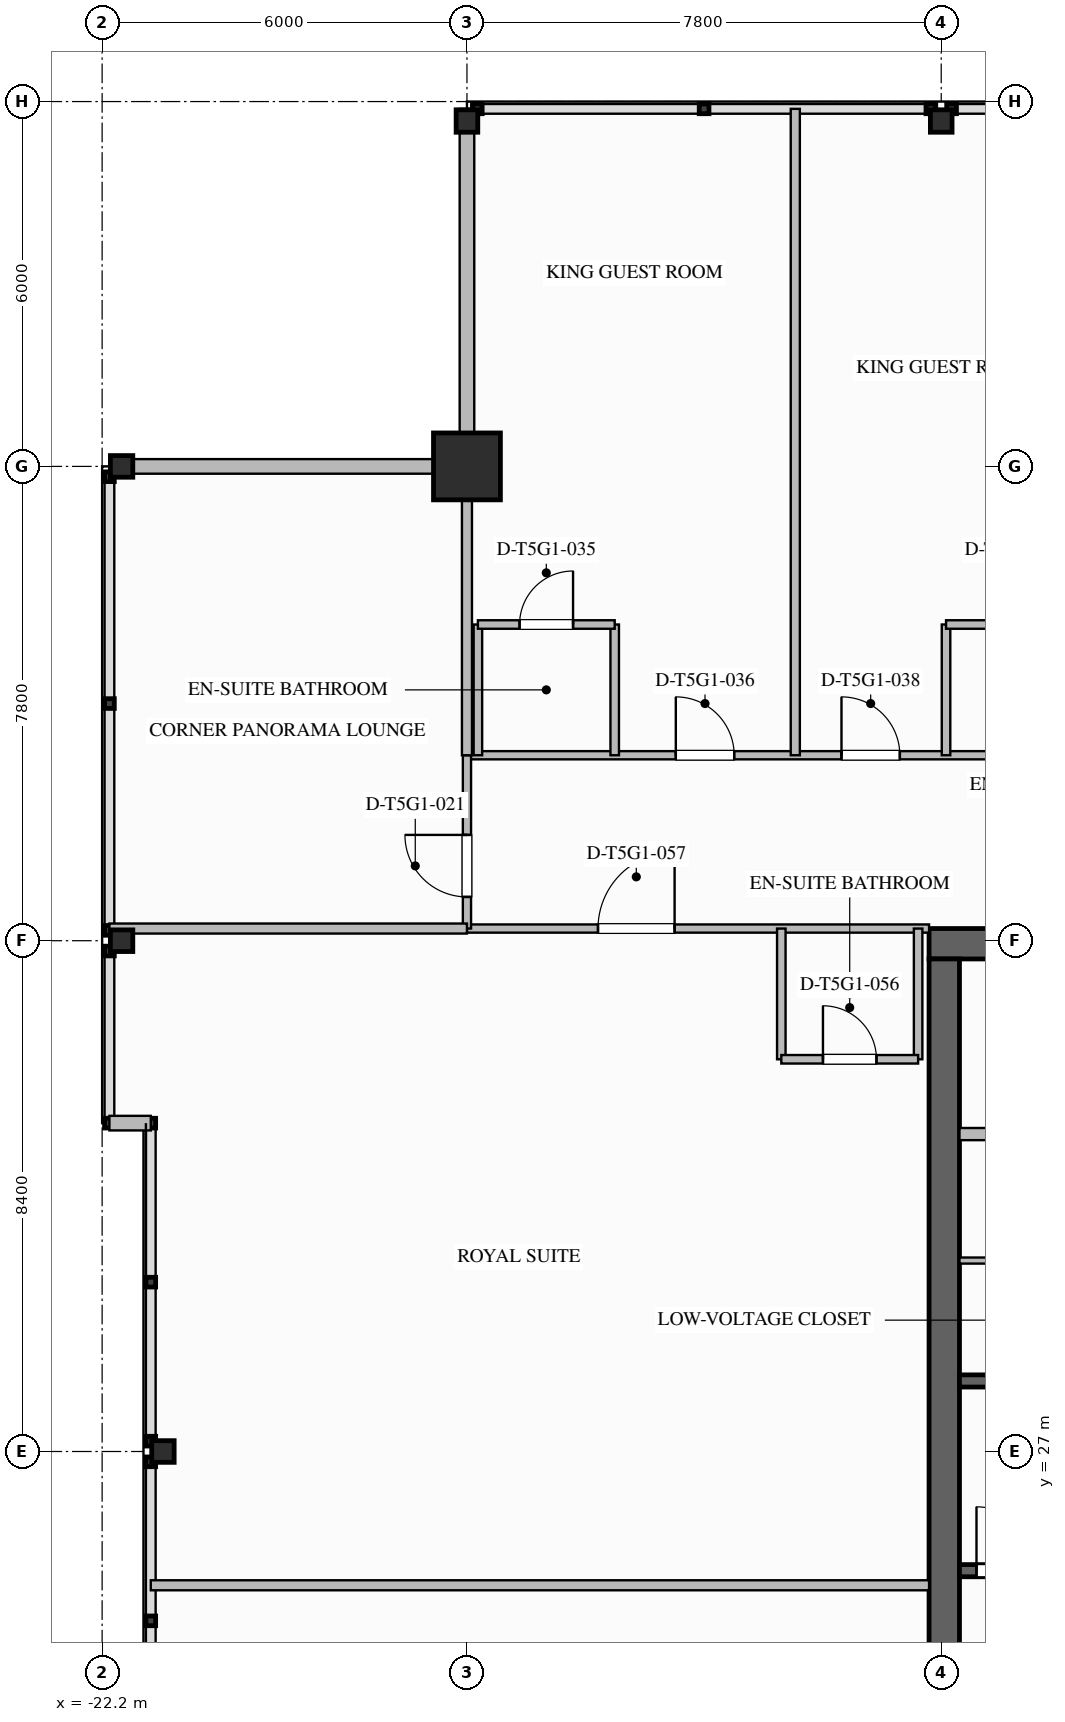
"""IFC4 building model, lengths in metres.
Left out: names, types, materials, properties, quantities, classifications, styles, units other than length and angle.
Written with IfcOpenShell. Run it as: python <this file> out.ifc"""

import sys

from ifc_helpers import new_model, si_unit, direction, frame, frame_2d, origin, origin_2d, place, context, subcontext, project, spatial, rectangle, i_section, extrude, element, fill, save


model = new_model("IFC4")
c1 = context("Model", 3, precision=1e-05, world=origin(), true_north=direction((0.0, 1.0)))
c2 = subcontext(c1, "Body", "Model", "MODEL_VIEW")
j1 = project(units=[si_unit("LENGTHUNIT", "METRE"), si_unit("PLANEANGLEUNIT", "RADIAN")], contexts=[c1])
p1 = place(None, origin())
s1 = spatial("IfcSite", under=j1, at=p1, CompositionType="ELEMENT")
p2 = place(p1, origin())
s2 = spatial("IfcBuilding", under=s1, at=p2, CompositionType="ELEMENT")
p3 = place(p2, frame((0.0, 0.0, 272.3)))
s3 = spatial("IfcBuildingStorey", under=s2, at=p3, CompositionType="ELEMENT", Elevation=272.3)
p4 = place(p3, frame((-8.6, 35.35, 0.0), z_axis=(0.0, 0.0, 1.0), x_axis=(1.0, 0.0, 0.0)))
e1 = element("IfcWall", 1, at=p4, inside=s3, PredefinedType="SHEAR", context=c2, shape_type="SweptSolid", body=[
    extrude(rectangle(XDim=17.2, YDim=0.5, at=frame_2d((8.6, 0.0))), origin(), (0.0, 0.0, 1.0), 3.65),
])
p5 = place(p3, frame((-8.35, 18.9, 0.0), z_axis=(0.0, 0.0, 1.0), x_axis=(0.0, 1.0, 0.0)))
e2 = element("IfcWall", 2, at=p5, inside=s3, PredefinedType="SHEAR", context=c2, shape_type="SweptSolid", body=[
    extrude(rectangle(XDim=16.2, YDim=0.5, at=frame_2d((8.1, 0.0))), origin(), (0.0, 0.0, 1.0), 3.65),
])
p6 = place(p3, frame((-16.2, 43.2, 0.0), z_axis=(0.0, 0.0, 1.0), x_axis=(1.0, 0.0, 0.0)))
e3 = element("IfcColumn", 3, at=p6, inside=s3, PredefinedType="COLUMN", context=c2, shape_type="SweptSolid", body=[
    extrude(rectangle(XDim=1.1, YDim=1.1, at=origin_2d()), origin(), (0.0, 0.0, 1.0), 3.65),
])
for number, where, z_axis, x_axis in (
    (4, (-21.2, 27.0, 0.0), (0.0, 0.0, 1.0), (1.0, 0.0, 0.0)),
    (5, (-21.88, 35.4, 0.0), (0.0, 0.0, 1.0), (1.0, 0.0, 0.0)),
    (6, (-21.88, 43.2, 0.0), (0.0, 0.0, 1.0), (1.0, 0.0, 0.0)),
    (7, (-16.2, 48.88, 0.0), (0.0, 0.0, 1.0), (0.0, 1.0, 0.0)),
    (8, (-8.4, 48.88, 0.0), (0.0, 0.0, 1.0), (0.0, 1.0, 0.0)),
):
    element("IfcColumn", number, at=place(p3, frame(where, z_axis=z_axis, x_axis=x_axis)), inside=s3, PredefinedType="COLUMN", context=c2, shape_type="SweptSolid", body=[
        extrude(i_section(OverallWidth=0.369, OverallDepth=0.356, WebThickness=0.011, FlangeThickness=0.018, FilletRadius=0.025, at=origin_2d()), origin(), (0.0, 0.0, 1.0), 3.647),
    ])
for number, where, z_axis, x_axis in (
    (9, (-22.08, 43.2, 0.0), (0.0, 0.0, 1.0), (1.0, 0.0, 0.0)),
    (10, (-16.2, 43.2, 0.0), (0.0, 0.0, 1.0), (0.0, 1.0, 0.0)),
):
    element("IfcWall", number, at=place(p3, frame(where, z_axis=z_axis, x_axis=x_axis)), inside=s3, PredefinedType="STANDARD", context=c2, shape_type="SweptSolid", body=[
        extrude(rectangle(XDim=5.88, YDim=0.24, at=frame_2d((2.94, 0.0))), origin(), (0.0, 0.0, 1.0), 2.779),
    ])
p7 = place(p3, frame((-21.4, 32.4, 0.0), z_axis=(0.0, 0.0, 1.0), x_axis=(-1.0, 0.0, 0.0)))
e11 = element("IfcWall", 11, at=p7, inside=s3, PredefinedType="STANDARD", context=c2, shape_type="SweptSolid", body=[
    extrude(rectangle(XDim=0.68, YDim=0.24, at=frame_2d((0.34, 0.0))), origin(), (0.0, 0.0, 1.0), 3.39),
])
p8 = place(p3, frame((-8.1, 25.04, 0.0), z_axis=(0.0, 0.0, 1.0), x_axis=(1.0, 0.0, 0.0)))
e12 = element("IfcWall", 12, at=p8, inside=s3, PredefinedType="SOLIDWALL", context=c2, shape_type="SweptSolid", body=[
    extrude(rectangle(XDim=8.1, YDim=0.2, at=frame_2d((4.05, 0.0))), origin(), (0.0, 0.0, 1.0), 3.39),
])
p9 = place(p8, frame((0.28, 0.0, 0.0)))
e13 = element("IfcOpeningElement", 13, at=p9, cuts=e12, PredefinedType="OPENING", context=c2, shape_type="SweptSolid", body=[
    extrude(rectangle(XDim=1.05, YDim=2.1, at=frame_2d((0.525, 1.05))), frame((0.0, 0.11, 0.0), z_axis=(0.0, -1.0, 0.0), x_axis=(1.0, 0.0, 0.0)), (0.0, 0.0, 1.0), 0.22),
])
p10 = place(p3, frame((-8.1, 28.16, 0.0), z_axis=(0.0, 0.0, 1.0), x_axis=(1.0, 0.0, 0.0)))
e14 = element("IfcWall", 14, at=p10, inside=s3, PredefinedType="SOLIDWALL", context=c2, shape_type="SweptSolid", body=[
    extrude(rectangle(XDim=8.1, YDim=0.2, at=frame_2d((4.05, 0.0))), origin(), (0.0, 0.0, 1.0), 3.39),
])
p11 = place(p3, frame((-8.1, 32.22, 0.0), z_axis=(0.0, 0.0, 1.0), x_axis=(1.0, 0.0, 0.0)))
e15 = element("IfcWall", 15, at=p11, inside=s3, PredefinedType="SOLIDWALL", context=c2, shape_type="SweptSolid", body=[
    extrude(rectangle(XDim=7.1, YDim=0.2, at=frame_2d((3.55, 0.0))), origin(), (0.0, 0.0, 1.0), 3.39),
])
p12 = place(p11, frame((0.95, 0.0, 0.0)))
e16 = element("IfcOpeningElement", 16, at=p12, cuts=e15, PredefinedType="OPENING", context=c2, shape_type="SweptSolid", body=[
    extrude(rectangle(XDim=1.1, YDim=2.2, at=frame_2d((0.55, 1.1))), frame((0.0, 0.11, 0.0), z_axis=(0.0, -1.0, 0.0), x_axis=(1.0, 0.0, 0.0)), (0.0, 0.0, 1.0), 0.22),
])
p13 = place(p11, frame((3.27, 0.0, 0.0)))
e17 = element("IfcOpeningElement", 17, at=p13, cuts=e15, PredefinedType="OPENING", context=c2, shape_type="SweptSolid", body=[
    extrude(rectangle(XDim=1.1, YDim=2.2, at=frame_2d((0.55, 1.1))), frame((0.0, 0.11, 0.0), z_axis=(0.0, -1.0, 0.0), x_axis=(1.0, 0.0, 0.0)), (0.0, 0.0, 1.0), 0.22),
])
p14 = place(p11, frame((5.59, 0.0, 0.0)))
e18 = element("IfcOpeningElement", 18, at=p14, cuts=e15, PredefinedType="OPENING", context=c2, shape_type="SweptSolid", body=[
    extrude(rectangle(XDim=1.1, YDim=2.2, at=frame_2d((0.55, 1.1))), frame((0.0, 0.11, 0.0), z_axis=(0.0, -1.0, 0.0), x_axis=(1.0, 0.0, 0.0)), (0.0, 0.0, 1.0), 0.22),
])
p15 = place(p3, frame((-8.1, 30.14, 0.0), z_axis=(0.0, 0.0, 1.0), x_axis=(1.0, 0.0, 0.0)))
e19 = element("IfcWall", 19, at=p15, inside=s3, PredefinedType="PARTITIONING", context=c2, shape_type="SweptSolid", body=[
    extrude(rectangle(XDim=7.1, YDim=0.1, at=frame_2d((3.55, 0.0))), origin(), (0.0, 0.0, 1.0), 3.39),
])
p16 = place(p15, frame((0.55, 0.0, 0.0)))
e20 = element("IfcOpeningElement", 20, at=p16, cuts=e19, PredefinedType="OPENING", context=c2, shape_type="SweptSolid", body=[
    extrude(rectangle(XDim=0.88, YDim=2.1, at=frame_2d((0.44, 1.05))), frame((0.0, 0.06, 0.0), z_axis=(0.0, -1.0, 0.0), x_axis=(1.0, 0.0, 0.0)), (0.0, 0.0, 1.0), 0.12),
])
p17 = place(p15, frame((3.6, 0.0, 0.0)))
e21 = element("IfcOpeningElement", 21, at=p17, cuts=e19, PredefinedType="OPENING", context=c2, shape_type="SweptSolid", body=[
    extrude(rectangle(XDim=0.92, YDim=2.1, at=frame_2d((0.46, 1.05))), frame((0.0, 0.06, 0.0), z_axis=(0.0, -1.0, 0.0), x_axis=(1.0, 0.0, 0.0)), (0.0, 0.0, 1.0), 0.12),
])
p18 = place(p3, frame((-16.2, 38.45, 0.0), z_axis=(0.0, 0.0, 1.0), x_axis=(1.0, 0.0, 0.0)))
e22 = element("IfcWall", 22, at=p18, inside=s3, PredefinedType="PARTITIONING", context=c2, shape_type="SweptSolid", body=[
    extrude(rectangle(XDim=38.28, YDim=0.135, at=frame_2d((19.14, 0.0))), origin(), (0.0, 0.0, 1.0), 3.39),
])
p19 = place(p18, frame((33.355, 0.0, 0.0)))
e23 = element("IfcOpeningElement", 23, at=p19, cuts=e22, PredefinedType="OPENING", context=c2, shape_type="SweptSolid", body=[
    extrude(rectangle(XDim=1.26, YDim=2.2, at=frame_2d((0.63, 1.1))), frame((0.0, 0.077, 0.0), z_axis=(0.0, -1.0, 0.0), x_axis=(1.0, 0.0, 0.0)), (0.0, 0.0, 1.0), 0.155),
])
p20 = place(p18, frame((3.435, 0.0, 0.0)))
e24 = element("IfcOpeningElement", 24, at=p20, cuts=e22, PredefinedType="OPENING", context=c2, shape_type="SweptSolid", body=[
    extrude(rectangle(XDim=0.96, YDim=2.15, at=frame_2d((0.48, 1.075))), frame((0.0, 0.077, 0.0), z_axis=(0.0, -1.0, 0.0), x_axis=(1.0, 0.0, 0.0)), (0.0, 0.0, 1.0), 0.155),
])
p21 = place(p18, frame((6.16, 0.0, 0.0)))
e25 = element("IfcOpeningElement", 25, at=p21, cuts=e22, PredefinedType="OPENING", context=c2, shape_type="SweptSolid", body=[
    extrude(rectangle(XDim=0.96, YDim=2.15, at=frame_2d((0.48, 1.075))), frame((0.0, 0.077, 0.0), z_axis=(0.0, -1.0, 0.0), x_axis=(1.0, 0.0, 0.0)), (0.0, 0.0, 1.0), 0.155),
])
p22 = place(p18, frame((13.99, 0.0, 0.0)))
e26 = element("IfcOpeningElement", 26, at=p22, cuts=e22, PredefinedType="OPENING", context=c2, shape_type="SweptSolid", body=[
    extrude(rectangle(XDim=0.96, YDim=2.15, at=frame_2d((0.48, 1.075))), frame((0.0, 0.077, 0.0), z_axis=(0.0, -1.0, 0.0), x_axis=(1.0, 0.0, 0.0)), (0.0, 0.0, 1.0), 0.155),
])
p23 = place(p18, frame((17.45, 0.0, 0.0)))
e27 = element("IfcOpeningElement", 27, at=p23, cuts=e22, PredefinedType="OPENING", context=c2, shape_type="SweptSolid", body=[
    extrude(rectangle(XDim=0.96, YDim=2.15, at=frame_2d((0.48, 1.075))), frame((0.0, 0.077, 0.0), z_axis=(0.0, -1.0, 0.0), x_axis=(1.0, 0.0, 0.0)), (0.0, 0.0, 1.0), 0.155),
])
p24 = place(p18, frame((25.281, 0.0, 0.0)))
e28 = element("IfcOpeningElement", 28, at=p24, cuts=e22, PredefinedType="OPENING", context=c2, shape_type="SweptSolid", body=[
    extrude(rectangle(XDim=0.96, YDim=2.15, at=frame_2d((0.48, 1.075))), frame((0.0, 0.077, 0.0), z_axis=(0.0, -1.0, 0.0), x_axis=(1.0, 0.0, 0.0)), (0.0, 0.0, 1.0), 0.155),
])
p25 = place(p18, frame((28.005, 0.0, 0.0)))
e29 = element("IfcOpeningElement", 29, at=p25, cuts=e22, PredefinedType="OPENING", context=c2, shape_type="SweptSolid", body=[
    extrude(rectangle(XDim=0.96, YDim=2.15, at=frame_2d((0.48, 1.075))), frame((0.0, 0.077, 0.0), z_axis=(0.0, -1.0, 0.0), x_axis=(1.0, 0.0, 0.0)), (0.0, 0.0, 1.0), 0.155),
])
p26 = place(p3, frame((-16.2, 35.6, 0.0), z_axis=(0.0, 0.0, 1.0), x_axis=(1.0, 0.0, 0.0)))
e30 = element("IfcWall", 30, at=p26, inside=s3, PredefinedType="PARTITIONING", context=c2, shape_type="SweptSolid", body=[
    extrude(rectangle(XDim=7.6, YDim=0.135, at=frame_2d((3.8, 0.0))), origin(), (0.0, 0.0, 1.0), 2.767),
])
p27 = place(p26, frame((2.155, 0.0, 0.0)))
e31 = element("IfcOpeningElement", 31, at=p27, cuts=e30, PredefinedType="OPENING", context=c2, shape_type="SweptSolid", body=[
    extrude(rectangle(XDim=1.26, YDim=2.2, at=frame_2d((0.63, 1.1))), frame((0.0, 0.077, 0.0), z_axis=(0.0, -1.0, 0.0), x_axis=(1.0, 0.0, 0.0)), (0.0, 0.0, 1.0), 0.155),
])
p28 = place(p3, frame((-16.2, 35.6, 0.0), z_axis=(0.0, 0.0, 1.0), x_axis=(0.0, 1.0, 0.0)))
e32 = element("IfcWall", 32, at=p28, inside=s3, PredefinedType="PARTITIONING", context=c2, shape_type="SweptSolid", body=[
    extrude(rectangle(XDim=2.85, YDim=0.135, at=frame_2d((1.425, 0.0))), origin(), (0.0, 0.0, 1.0), 2.764),
])
p29 = place(p28, frame((0.52, 0.0, 0.0)))
e33 = element("IfcOpeningElement", 33, at=p29, cuts=e32, PredefinedType="OPENING", context=c2, shape_type="SweptSolid", body=[
    extrude(rectangle(XDim=1.02, YDim=2.15, at=frame_2d((0.51, 1.075))), frame((0.0, 0.077, 0.0), z_axis=(0.0, -1.0, 0.0), x_axis=(1.0, 0.0, 0.0)), (0.0, 0.0, 1.0), 0.155),
])
p30 = place(p3, frame((-16.2, 38.45, 0.0), z_axis=(0.0, 0.0, 1.0), x_axis=(0.0, 1.0, 0.0)))
e34 = element("IfcWall", 34, at=p30, inside=s3, PredefinedType="PARTITIONING", context=c2, shape_type="SweptSolid", body=[
    extrude(rectangle(XDim=4.63, YDim=0.165, at=frame_2d((2.315, 0.0))), origin(), (0.0, 0.0, 1.0), 2.764),
])
p31 = place(p3, frame((-22.08, 35.6, 0.0), z_axis=(0.0, 0.0, 1.0), x_axis=(1.0, 0.0, 0.0)))
e35 = element("IfcWall", 35, at=p31, inside=s3, PredefinedType="PARTITIONING", context=c2, shape_type="SweptSolid", body=[
    extrude(rectangle(XDim=5.88, YDim=0.165, at=frame_2d((2.94, 0.0))), origin(), (0.0, 0.0, 1.0), 2.764),
])
p32 = place(p3, frame((-16.02, 38.45, 0.0), z_axis=(0.0, 0.0, 1.0), x_axis=(0.0, 1.0, 0.0)))
e36 = element("IfcWall", 36, at=p32, inside=s3, PredefinedType="PLUMBINGWALL", context=c2, shape_type="SweptSolid", body=[
    extrude(rectangle(XDim=2.15, YDim=0.14, at=frame_2d((1.075, 0.0))), origin(), (0.0, 0.0, 1.0), 2.764),
])
p33 = place(p3, frame((-13.77, 38.45, 0.0), z_axis=(0.0, 0.0, 1.0), x_axis=(0.0, 1.0, 0.0)))
e37 = element("IfcWall", 37, at=p33, inside=s3, PredefinedType="PLUMBINGWALL", context=c2, shape_type="SweptSolid", body=[
    extrude(rectangle(XDim=2.15, YDim=0.14, at=frame_2d((1.075, 0.0))), origin(), (0.0, 0.0, 1.0), 3.39),
])
p34 = place(p3, frame((-16.02, 40.6, 0.0), z_axis=(0.0, 0.0, 1.0), x_axis=(1.0, 0.0, 0.0)))
e38 = element("IfcWall", 38, at=p34, inside=s3, PredefinedType="PLUMBINGWALL", context=c2, shape_type="SweptSolid", body=[
    extrude(rectangle(XDim=2.25, YDim=0.14, at=frame_2d((1.125, 0.0))), origin(), (0.0, 0.0, 1.0), 3.39),
])
p35 = place(p34, frame((0.685, 0.0, 0.0)))
e39 = element("IfcOpeningElement", 39, at=p35, cuts=e38, PredefinedType="OPENING", context=c2, shape_type="SweptSolid", body=[
    extrude(rectangle(XDim=0.88, YDim=2.1, at=frame_2d((0.44, 1.05))), frame((0.0, 0.08, 0.0), z_axis=(0.0, -1.0, 0.0), x_axis=(1.0, 0.0, 0.0)), (0.0, 0.0, 1.0), 0.16),
])
p36 = place(p3, frame((-10.8, 38.45, 0.0), z_axis=(0.0, 0.0, 1.0), x_axis=(0.0, 1.0, 0.0)))
e40 = element("IfcWall", 40, at=p36, inside=s3, PredefinedType="PARTITIONING", context=c2, shape_type="SweptSolid", body=[
    extrude(rectangle(XDim=10.63, YDim=0.15, at=frame_2d((5.315, 0.0))), origin(), (0.0, 0.0, 1.0), 3.39),
])
p37 = place(p3, frame((-8.321, 38.45, 0.0), z_axis=(0.0, 0.0, 1.0), x_axis=(0.0, 1.0, 0.0)))
e41 = element("IfcWall", 41, at=p37, inside=s3, PredefinedType="PLUMBINGWALL", context=c2, shape_type="SweptSolid", body=[
    extrude(rectangle(XDim=2.15, YDim=0.14, at=frame_2d((1.075, 0.0))), origin(), (0.0, 0.0, 1.0), 2.767),
])
p38 = place(p3, frame((-8.321, 40.6, 0.0), z_axis=(0.0, 0.0, 1.0), x_axis=(1.0, 0.0, 0.0)))
e42 = element("IfcWall", 42, at=p38, inside=s3, PredefinedType="PLUMBINGWALL", context=c2, shape_type="SweptSolid", body=[
    extrude(rectangle(XDim=2.25, YDim=0.14, at=frame_2d((1.125, 0.0))), origin(), (0.0, 0.0, 1.0), 3.39),
])
p39 = place(p38, frame((0.685, 0.0, 0.0)))
e43 = element("IfcOpeningElement", 43, at=p39, cuts=e42, PredefinedType="OPENING", context=c2, shape_type="SweptSolid", body=[
    extrude(rectangle(XDim=0.88, YDim=2.1, at=frame_2d((0.44, 1.05))), frame((0.0, 0.08, 0.0), z_axis=(0.0, -1.0, 0.0), x_axis=(1.0, 0.0, 0.0)), (0.0, 0.0, 1.0), 0.16),
])
p40 = place(p3, frame((-21.4, 24.8, 0.0), z_axis=(0.0, 0.0, 1.0), x_axis=(1.0, 0.0, 0.0)))
e44 = element("IfcWall", 44, at=p40, inside=s3, PredefinedType="PARTITIONING", context=c2, shape_type="SweptSolid", body=[
    extrude(rectangle(XDim=12.8, YDim=0.165, at=frame_2d((6.4, 0.0))), origin(), (0.0, 0.0, 1.0), 3.39),
])
for number, where, z_axis, x_axis in (
    (45, (-11.03, 35.6, 0.0), (0.0, 0.0, 1.0), (0.0, -1.0, 0.0)),
    (46, (-8.78, 35.6, 0.0), (0.0, 0.0, 1.0), (0.0, -1.0, 0.0)),
):
    element("IfcWall", number, at=place(p3, frame(where, z_axis=z_axis, x_axis=x_axis)), inside=s3, PredefinedType="PLUMBINGWALL", context=c2, shape_type="SweptSolid", body=[
        extrude(rectangle(XDim=2.15, YDim=0.14, at=frame_2d((1.075, 0.0))), origin(), (0.0, 0.0, 1.0), 3.39),
    ])
p41 = place(p3, frame((-11.03, 33.45, 0.0), z_axis=(0.0, 0.0, 1.0), x_axis=(1.0, 0.0, 0.0)))
e47 = element("IfcWall", 47, at=p41, inside=s3, PredefinedType="PLUMBINGWALL", context=c2, shape_type="SweptSolid", body=[
    extrude(rectangle(XDim=2.25, YDim=0.14, at=frame_2d((1.125, 0.0))), origin(), (0.0, 0.0, 1.0), 3.39),
])
p42 = place(p41, frame((0.685, 0.0, 0.0)))
e48 = element("IfcOpeningElement", 48, at=p42, cuts=e47, PredefinedType="OPENING", context=c2, shape_type="SweptSolid", body=[
    extrude(rectangle(XDim=0.88, YDim=2.1, at=frame_2d((0.44, 1.05))), frame((0.0, 0.08, 0.0), z_axis=(0.0, -1.0, 0.0), x_axis=(1.0, 0.0, 0.0)), (0.0, 0.0, 1.0), 0.16),
])
p43 = place(p9, origin())
e49 = element("IfcDoor", 49, at=p43, inside=s3, OperationType="SINGLE_SWING_LEFT", PredefinedType="DOOR", context=c2, shape_type="SweptSolid", body=[
    extrude(rectangle(XDim=1.05, YDim=2.1, at=frame_2d((0.525, 1.05))), frame((0.0, 0.025, 0.0), z_axis=(0.0, -1.0, 0.0), x_axis=(1.0, 0.0, 0.0)), (0.0, 0.0, 1.0), 0.05),
])
fill(e13, e49)
p44 = place(p29, origin())
e50 = element("IfcDoor", 50, at=p44, inside=s3, OperationType="SINGLE_SWING_RIGHT", PredefinedType="DOOR", context=c2, shape_type="SweptSolid", body=[
    extrude(rectangle(XDim=1.02, YDim=2.15, at=frame_2d((0.51, 1.075))), frame((0.0, 0.025, 0.0), z_axis=(0.0, -1.0, 0.0), x_axis=(1.0, 0.0, 0.0)), (0.0, 0.0, 1.0), 0.05),
])
fill(e33, e50)
p45 = place(p35, origin())
e51 = element("IfcDoor", 51, at=p45, inside=s3, OperationType="SINGLE_SWING_RIGHT", PredefinedType="DOOR", context=c2, shape_type="SweptSolid", body=[
    extrude(rectangle(XDim=0.88, YDim=2.1, at=frame_2d((0.44, 1.05))), frame((0.0, 0.025, 0.0), z_axis=(0.0, -1.0, 0.0), x_axis=(1.0, 0.0, 0.0)), (0.0, 0.0, 1.0), 0.05),
])
fill(e39, e51)
p46 = place(p20, origin())
e52 = element("IfcDoor", 52, at=p46, inside=s3, OperationType="SINGLE_SWING_LEFT", PredefinedType="DOOR", context=c2, shape_type="SweptSolid", body=[
    extrude(rectangle(XDim=0.96, YDim=2.15, at=frame_2d((0.48, 1.075))), frame((0.0, 0.025, 0.0), z_axis=(0.0, -1.0, 0.0), x_axis=(1.0, 0.0, 0.0)), (0.0, 0.0, 1.0), 0.05),
])
fill(e24, e52)
p47 = place(p21, origin())
e53 = element("IfcDoor", 53, at=p47, inside=s3, OperationType="SINGLE_SWING_LEFT", PredefinedType="DOOR", context=c2, shape_type="SweptSolid", body=[
    extrude(rectangle(XDim=0.96, YDim=2.15, at=frame_2d((0.48, 1.075))), frame((0.0, 0.025, 0.0), z_axis=(0.0, -1.0, 0.0), x_axis=(1.0, 0.0, 0.0)), (0.0, 0.0, 1.0), 0.05),
])
fill(e25, e53)
p48 = place(p42, origin())
e54 = element("IfcDoor", 54, at=p48, inside=s3, OperationType="SINGLE_SWING_LEFT", PredefinedType="DOOR", context=c2, shape_type="SweptSolid", body=[
    extrude(rectangle(XDim=0.88, YDim=2.1, at=frame_2d((0.44, 1.05))), frame((0.0, 0.025, 0.0), z_axis=(0.0, -1.0, 0.0), x_axis=(1.0, 0.0, 0.0)), (0.0, 0.0, 1.0), 0.05),
])
fill(e48, e54)
p49 = place(p27, origin())
e55 = element("IfcDoor", 55, at=p49, inside=s3, OperationType="SINGLE_SWING_RIGHT", PredefinedType="DOOR", context=c2, shape_type="SweptSolid", body=[
    extrude(rectangle(XDim=1.26, YDim=2.2, at=frame_2d((0.63, 1.1))), frame((0.0, 0.025, 0.0), z_axis=(0.0, -1.0, 0.0), x_axis=(1.0, 0.0, 0.0)), (0.0, 0.0, 1.0), 0.05),
])
fill(e31, e55)
save(model, sys.argv[1])
